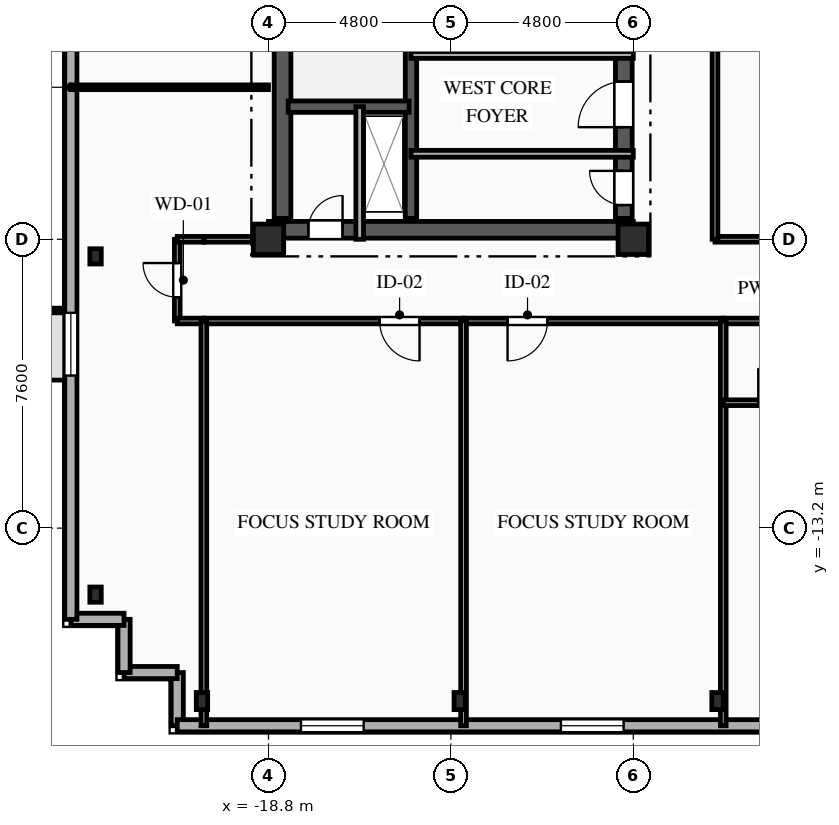
"""IFC4 building model, lengths in metres.
Left out: names, types, materials, properties, quantities, classifications, styles, units other than length and angle.
Written with IfcOpenShell. Run it as: python <this file> out.ifc"""

import sys

from ifc_helpers import new_model, si_unit, direction, frame, frame_2d, origin, origin_2d, place, context, subcontext, project, spatial, rectangle, i_section, extrude, element, fill, save


model = new_model("IFC4")
c1 = context("Model", 3, precision=1e-05, world=origin(), true_north=direction((0.0, 1.0)))
c2 = subcontext(c1, "Body", "Model", "MODEL_VIEW")
j1 = project(units=[si_unit("LENGTHUNIT", "METRE"), si_unit("PLANEANGLEUNIT", "RADIAN")], contexts=[c1])
p1 = place(None, origin())
s1 = spatial("IfcSite", under=j1, at=p1, CompositionType="ELEMENT")
p2 = place(p1, origin())
s2 = spatial("IfcBuilding", under=s1, at=p2, CompositionType="ELEMENT")
p3 = place(p2, frame((0.0, 0.0, 238.35)))
s3 = spatial("IfcBuildingStorey", under=s2, at=p3, CompositionType="ELEMENT", Elevation=238.35)
for number, where, z_axis, x_axis in (
    (1, (-18.8, -5.6, 0.0), (0.0, 0.0, 1.0), (1.0, 0.0, 0.0)),
    (2, (-9.2, -5.6, 0.0), (0.0, 0.0, 1.0), (1.0, 0.0, 0.0)),
):
    element("IfcColumn", number, at=place(p3, frame(where, z_axis=z_axis, x_axis=x_axis)), inside=s3, PredefinedType="COLUMN", context=c2, shape_type="SweptSolid", body=[
        extrude(rectangle(XDim=0.8, YDim=0.8, at=origin_2d()), origin(), (0.0, 0.0, 1.0), 3.35),
    ])
for number, where, z_axis, x_axis in (
    (3, (-20.55, -17.75, 0.0), (0.0, 0.0, 1.0), (1.0, 0.0, 0.0)),
    (4, (-13.767, -17.75, 0.0), (0.0, 0.0, 1.0), (1.0, 0.0, 0.0)),
    (5, (-6.983, -17.75, 0.0), (0.0, 0.0, 1.0), (1.0, 0.0, 0.0)),
):
    element("IfcColumn", number, at=place(p3, frame(where, z_axis=z_axis, x_axis=x_axis)), inside=s3, PredefinedType="COLUMN", context=c2, shape_type="SweptSolid", body=[
        extrude(i_section(OverallWidth=0.3, OverallDepth=0.45, WebThickness=0.014, FlangeThickness=0.026, FilletRadius=0.027, at=origin_2d()), origin(), (0.0, 0.0, 1.0), 3.35),
    ])
for number, where, z_axis, x_axis in (
    (6, (-23.35, -6.05, 0.0), (0.0, 0.0, 1.0), (1.0, 0.0, 0.0)),
    (7, (-23.35, -14.95, 0.0), (0.0, 0.0, 1.0), (1.0, 0.0, 0.0)),
):
    element("IfcColumn", number, at=place(p3, frame(where, z_axis=z_axis, x_axis=x_axis)), inside=s3, PredefinedType="COLUMN", context=c2, shape_type="SweptSolid", body=[
        extrude(i_section(OverallWidth=0.3, OverallDepth=0.4, WebThickness=0.013, FlangeThickness=0.024, FilletRadius=0.027, at=origin_2d()), origin(), (0.0, 0.0, 1.0), 3.35),
    ])
p4 = place(p3, frame((-21.2, -18.4, 0.0), z_axis=(0.0, 0.0, 1.0), x_axis=(0.0, 1.0, 0.0)))
e8 = element("IfcWall", 8, at=p4, inside=s3, PredefinedType="SOLIDWALL", context=c2, shape_type="SweptSolid", body=[
    extrude(rectangle(XDim=1.4, YDim=0.32, at=frame_2d((0.7, 0.0))), origin(), (0.0, 0.0, 1.0), 3.04),
])
p5 = place(p3, frame((-21.2, -17.0, 0.0), z_axis=(0.0, 0.0, 1.0), x_axis=(-1.0, 0.0, 0.0)))
e9 = element("IfcWall", 9, at=p5, inside=s3, PredefinedType="SOLIDWALL", context=c2, shape_type="SweptSolid", body=[
    extrude(rectangle(XDim=1.4, YDim=0.32, at=frame_2d((0.7, 0.0))), origin(), (0.0, 0.0, 1.0), 3.04),
])
for number, where, z_axis, x_axis in (
    (10, (-22.6, -17.0, 0.0), (0.0, 0.0, 1.0), (0.0, 1.0, 0.0)),
    (11, (-22.6, -15.6, 0.0), (0.0, 0.0, 1.0), (-1.0, 0.0, 0.0)),
):
    element("IfcWall", number, at=place(p3, frame(where, z_axis=z_axis, x_axis=x_axis)), inside=s3, PredefinedType="SOLIDWALL", context=c2, shape_type="SweptSolid", body=[
        extrude(rectangle(XDim=1.4, YDim=0.32, at=frame_2d((0.7, 0.0))), origin(), (0.0, 0.0, 1.0), 3.04),
    ])
p6 = place(p3, frame((-24.0, -15.6, 0.0), z_axis=(0.0, 0.0, 1.0), x_axis=(0.0, 1.0, 0.0)))
e12 = element("IfcWall", 12, at=p6, inside=s3, PredefinedType="SOLIDWALL", context=c2, shape_type="SweptSolid", body=[
    extrude(rectangle(XDim=28.0, YDim=0.32, at=frame_2d((14.0, 0.0))), origin(), (0.0, 0.0, 1.0), 3.04),
])
p7 = place(p6, frame((6.415, 0.0, 0.85)))
e13 = element("IfcOpeningElement", 13, at=p7, cuts=e12, PredefinedType="OPENING", context=c2, shape_type="SweptSolid", body=[
    extrude(rectangle(XDim=1.65, YDim=1.85, at=frame_2d((0.825, 0.925))), frame((0.0, 0.17, 0.0), z_axis=(0.0, -1.0, 0.0), x_axis=(1.0, 0.0, 0.0)), (0.0, 0.0, 1.0), 0.34),
])
p8 = place(p6, frame((20.04, 0.0, 0.85)))
e14 = element("IfcOpeningElement", 14, at=p8, cuts=e12, PredefinedType="OPENING", context=c2, shape_type="SweptSolid", body=[
    extrude(rectangle(XDim=1.6, YDim=1.85, at=frame_2d((0.8, 0.925))), frame((0.0, 0.17, 0.0), z_axis=(0.0, -1.0, 0.0), x_axis=(1.0, 0.0, 0.0)), (0.0, 0.0, 1.0), 0.34),
])
p9 = place(p3, frame((20.8, -18.4, 0.0), z_axis=(0.0, 0.0, 1.0), x_axis=(-1.0, 0.0, 0.0)))
e15 = element("IfcWall", 15, at=p9, inside=s3, PredefinedType="SOLIDWALL", context=c2, shape_type="SweptSolid", body=[
    extrude(rectangle(XDim=42.0, YDim=0.32, at=frame_2d((21.0, 0.0))), origin(), (0.0, 0.0, 1.0), 3.04),
])
p10 = place(p9, frame((3.015, 0.0, 0.85)))
e16 = element("IfcOpeningElement", 16, at=p10, cuts=e15, PredefinedType="OPENING", context=c2, shape_type="SweptSolid", body=[
    extrude(rectangle(XDim=1.65, YDim=1.85, at=frame_2d((0.825, 0.925))), frame((0.0, 0.17, 0.0), z_axis=(0.0, -1.0, 0.0), x_axis=(1.0, 0.0, 0.0)), (0.0, 0.0, 1.0), 0.34),
])
p11 = place(p9, frame((9.775, 0.0, 0.85)))
e17 = element("IfcOpeningElement", 17, at=p11, cuts=e15, PredefinedType="OPENING", context=c2, shape_type="SweptSolid", body=[
    extrude(rectangle(XDim=1.65, YDim=1.85, at=frame_2d((0.825, 0.925))), frame((0.0, 0.17, 0.0), z_axis=(0.0, -1.0, 0.0), x_axis=(1.0, 0.0, 0.0)), (0.0, 0.0, 1.0), 0.34),
])
p12 = place(p9, frame((19.74, 0.0, 0.85)))
e18 = element("IfcOpeningElement", 18, at=p12, cuts=e15, PredefinedType="OPENING", context=c2, shape_type="SweptSolid", body=[
    extrude(rectangle(XDim=2.2, YDim=1.85, at=frame_2d((1.1, 0.925))), frame((0.0, 0.17, 0.0), z_axis=(0.0, -1.0, 0.0), x_axis=(1.0, 0.0, 0.0)), (0.0, 0.0, 1.0), 0.34),
])
p13 = place(p9, frame((30.255, 0.0, 0.85)))
e19 = element("IfcOpeningElement", 19, at=p13, cuts=e15, PredefinedType="OPENING", context=c2, shape_type="SweptSolid", body=[
    extrude(rectangle(XDim=1.65, YDim=1.85, at=frame_2d((0.825, 0.925))), frame((0.0, 0.17, 0.0), z_axis=(0.0, -1.0, 0.0), x_axis=(1.0, 0.0, 0.0)), (0.0, 0.0, 1.0), 0.34),
])
p14 = place(p9, frame((37.095, 0.0, 0.85)))
e20 = element("IfcOpeningElement", 20, at=p14, cuts=e15, PredefinedType="OPENING", context=c2, shape_type="SweptSolid", body=[
    extrude(rectangle(XDim=1.65, YDim=1.85, at=frame_2d((0.825, 0.925))), frame((0.0, 0.17, 0.0), z_axis=(0.0, -1.0, 0.0), x_axis=(1.0, 0.0, 0.0)), (0.0, 0.0, 1.0), 0.34),
])
p15 = place(p3, frame((-18.8, -5.35, 0.0), z_axis=(0.0, 0.0, 1.0), x_axis=(1.0, 0.0, 0.0)))
e21 = element("IfcWall", 21, at=p15, inside=s3, PredefinedType="SHEAR", context=c2, shape_type="SweptSolid", body=[
    extrude(rectangle(XDim=9.6, YDim=0.44, at=frame_2d((4.8, 0.0))), origin(), (0.0, 0.0, 1.0), 3.04),
])
p16 = place(p15, frame((1.05, 0.0, 0.0)))
e22 = element("IfcOpeningElement", 22, at=p16, cuts=e21, PredefinedType="OPENING", context=c2, shape_type="SweptSolid", body=[
    extrude(rectangle(XDim=0.9, YDim=2.1, at=frame_2d((0.45, 1.05))), frame((0.0, 0.23, 0.0), z_axis=(0.0, -1.0, 0.0), x_axis=(1.0, 0.0, 0.0)), (0.0, 0.0, 1.0), 0.46),
])
p17 = place(p3, frame((-18.43, -5.05, 0.0), z_axis=(0.0, 0.0, 1.0), x_axis=(0.0, 1.0, 0.0)))
e23 = element("IfcWall", 23, at=p17, inside=s3, PredefinedType="SHEAR", context=c2, shape_type="SweptSolid", body=[
    extrude(rectangle(XDim=10.1, YDim=0.44, at=frame_2d((5.05, 0.0))), origin(), (0.0, 0.0, 1.0), 3.04),
])
p18 = place(p3, frame((-9.45, -5.05, 0.0), z_axis=(0.0, 0.0, 1.0), x_axis=(0.0, 1.0, 0.0)))
e24 = element("IfcWall", 24, at=p18, inside=s3, PredefinedType="SHEAR", context=c2, shape_type="SweptSolid", body=[
    extrude(rectangle(XDim=10.1, YDim=0.44, at=frame_2d((5.05, 0.0))), origin(), (0.0, 0.0, 1.0), 3.04),
])
p19 = place(p18, frame((7.15, 0.0, 0.0)))
e25 = element("IfcOpeningElement", 25, at=p19, cuts=e24, PredefinedType="OPENING", context=c2, shape_type="SweptSolid", body=[
    extrude(rectangle(XDim=0.9, YDim=2.1, at=frame_2d((0.45, 1.05))), frame((0.0, 0.23, 0.0), z_axis=(0.0, -1.0, 0.0), x_axis=(1.0, 0.0, 0.0)), (0.0, 0.0, 1.0), 0.46),
])
p20 = place(p18, frame((2.4, 0.0, 0.0)))
e26 = element("IfcOpeningElement", 26, at=p20, cuts=e24, PredefinedType="OPENING", context=c2, shape_type="SweptSolid", body=[
    extrude(rectangle(XDim=1.2, YDim=2.15, at=frame_2d((0.6, 1.075))), frame((0.0, 0.23, 0.0), z_axis=(0.0, -1.0, 0.0), x_axis=(1.0, 0.0, 0.0)), (0.0, 0.0, 1.0), 0.46),
])
p21 = place(p18, frame((0.35, 0.0, 0.0)))
e27 = element("IfcOpeningElement", 27, at=p21, cuts=e24, PredefinedType="OPENING", context=c2, shape_type="SweptSolid", body=[
    extrude(rectangle(XDim=0.9, YDim=2.1, at=frame_2d((0.45, 1.05))), frame((0.0, 0.23, 0.0), z_axis=(0.0, -1.0, 0.0), x_axis=(1.0, 0.0, 0.0)), (0.0, 0.0, 1.0), 0.46),
])
p22 = place(p18, frame((5.0, 0.0, 0.0)))
e28 = element("IfcOpeningElement", 28, at=p22, cuts=e24, PredefinedType="OPENING", context=c2, shape_type="SweptSolid", body=[
    extrude(rectangle(XDim=0.9, YDim=2.1, at=frame_2d((0.45, 1.05))), frame((0.0, 0.23, 0.0), z_axis=(0.0, -1.0, 0.0), x_axis=(1.0, 0.0, 0.0)), (0.0, 0.0, 1.0), 0.46),
])
p23 = place(p3, frame((-15.05, -5.05, 0.0), z_axis=(0.0, 0.0, 1.0), x_axis=(0.0, 1.0, 0.0)))
e29 = element("IfcWall", 29, at=p23, inside=s3, PredefinedType="SHEAR", context=c2, shape_type="SweptSolid", body=[
    extrude(rectangle(XDim=10.1, YDim=0.3, at=frame_2d((5.05, 0.0))), origin(), (0.0, 0.0, 1.0), 3.04),
])
p24 = place(p3, frame((-18.28, -2.11, 0.0), z_axis=(0.0, 0.0, 1.0), x_axis=(1.0, 0.0, 0.0)))
e30 = element("IfcWall", 30, at=p24, inside=s3, PredefinedType="SHEAR", context=c2, shape_type="SweptSolid", body=[
    extrude(rectangle(XDim=3.18, YDim=0.3, at=frame_2d((1.59, 0.0))), origin(), (0.0, 0.0, 1.0), 3.04),
])
p25 = place(p3, frame((-16.4, -5.6, 0.0), z_axis=(0.0, 0.0, 1.0), x_axis=(0.0, 1.0, 0.0)))
e31 = element("IfcWall", 31, at=p25, inside=s3, PredefinedType="PARTITIONING", context=c2, shape_type="SweptSolid", body=[
    extrude(rectangle(XDim=3.49, YDim=0.2, at=frame_2d((1.745, 0.0))), origin(), (0.0, 0.0, 1.0), 3.04),
])
p26 = place(p3, frame((-15.05, -3.35, 0.0), z_axis=(0.0, 0.0, 1.0), x_axis=(1.0, 0.0, 0.0)))
e32 = element("IfcWall", 32, at=p26, inside=s3, PredefinedType="PARTITIONING", context=c2, shape_type="SweptSolid", body=[
    extrude(rectangle(XDim=5.85, YDim=0.18, at=frame_2d((2.925, 0.0))), origin(), (0.0, 0.0, 1.0), 2.755),
])
p27 = place(p3, frame((-9.2, -0.75, 0.0), z_axis=(0.0, 0.0, 1.0), x_axis=(-1.0, 0.0, 0.0)))
e33 = element("IfcWall", 33, at=p27, inside=s3, PredefinedType="PARTITIONING", context=c2, shape_type="SweptSolid", body=[
    extrude(rectangle(XDim=5.85, YDim=0.18, at=frame_2d((2.925, 0.0))), origin(), (0.0, 0.0, 1.0), 3.04),
])
p28 = place(p3, frame((-21.2, -7.75, 0.0), z_axis=(0.0, 0.0, 1.0), x_axis=(0.0, 1.0, 0.0)))
e34 = element("IfcWall", 34, at=p28, inside=s3, PredefinedType="PARTITIONING", context=c2, shape_type="SweptSolid", body=[
    extrude(rectangle(XDim=2.15, YDim=0.15, at=frame_2d((1.075, 0.0))), origin(), (0.0, 0.0, 1.0), 2.695),
])
p29 = place(p28, frame((0.625, 0.0, 0.0)))
e35 = element("IfcOpeningElement", 35, at=p29, cuts=e34, PredefinedType="OPENING", context=c2, shape_type="SweptSolid", body=[
    extrude(rectangle(XDim=0.9, YDim=2.1, at=frame_2d((0.45, 1.05))), frame((0.0, 0.085, 0.0), z_axis=(0.0, -1.0, 0.0), x_axis=(1.0, 0.0, 0.0)), (0.0, 0.0, 1.0), 0.17),
])
p30 = place(p3, frame((-20.5, -5.6, 0.0), z_axis=(0.0, 0.0, 1.0), x_axis=(1.0, 0.0, 0.0)))
e36 = element("IfcWall", 36, at=p30, inside=s3, PredefinedType="PARTITIONING", context=c2, shape_type="SweptSolid", body=[
    extrude(rectangle(XDim=1.7, YDim=0.15, at=frame_2d((0.85, 0.0))), origin(), (0.0, 0.0, 1.0), 3.04),
])
for number, where, z_axis, x_axis in (
    (37, (-20.5, -7.75, 0.0), (0.0, 0.0, 1.0), (-1.0, 0.0, 0.0)),
    (38, (-21.2, -5.6, 0.0), (0.0, 0.0, 1.0), (1.0, 0.0, 0.0)),
):
    element("IfcWall", number, at=place(p3, frame(where, z_axis=z_axis, x_axis=x_axis)), inside=s3, PredefinedType="PARTITIONING", context=c2, shape_type="SweptSolid", body=[
        extrude(rectangle(XDim=0.7, YDim=0.15, at=frame_2d((0.35, 0.0))), origin(), (0.0, 0.0, 1.0), 3.04),
    ])
p31 = place(p3, frame((-13.667, -7.75, 0.0), z_axis=(0.0, 0.0, 1.0), x_axis=(-1.0, 0.0, 0.0)))
e39 = element("IfcWall", 39, at=p31, inside=s3, PredefinedType="PARTITIONING", context=c2, shape_type="SweptSolid", body=[
    extrude(rectangle(XDim=6.833, YDim=0.15, at=frame_2d((3.417, 0.0))), origin(), (0.0, 0.0, 1.0), 3.04),
])
p32 = place(p31, frame((1.158, 0.0, 0.0)))
e40 = element("IfcOpeningElement", 40, at=p32, cuts=e39, PredefinedType="OPENING", context=c2, shape_type="SweptSolid", body=[
    extrude(rectangle(XDim=1.05, YDim=2.15, at=frame_2d((0.525, 1.075))), frame((0.0, 0.085, 0.0), z_axis=(0.0, -1.0, 0.0), x_axis=(1.0, 0.0, 0.0)), (0.0, 0.0, 1.0), 0.17),
])
p33 = place(p3, frame((-6.833, -7.75, 0.0), z_axis=(0.0, 0.0, 1.0), x_axis=(-1.0, 0.0, 0.0)))
e41 = element("IfcWall", 41, at=p33, inside=s3, PredefinedType="PARTITIONING", context=c2, shape_type="SweptSolid", body=[
    extrude(rectangle(XDim=6.833, YDim=0.15, at=frame_2d((3.417, 0.0))), origin(), (0.0, 0.0, 1.0), 3.04),
])
p34 = place(p33, frame((4.625, 0.0, 0.0)))
e42 = element("IfcOpeningElement", 42, at=p34, cuts=e41, PredefinedType="OPENING", context=c2, shape_type="SweptSolid", body=[
    extrude(rectangle(XDim=1.05, YDim=2.15, at=frame_2d((0.525, 1.075))), frame((0.0, 0.085, 0.0), z_axis=(0.0, -1.0, 0.0), x_axis=(1.0, 0.0, 0.0)), (0.0, 0.0, 1.0), 0.17),
])
p35 = place(p3, frame((-4.383, -7.75, 0.0), z_axis=(0.0, 0.0, 1.0), x_axis=(-1.0, 0.0, 0.0)))
e43 = element("IfcWall", 43, at=p35, inside=s3, PredefinedType="PLUMBINGWALL", context=c2, shape_type="SweptSolid", body=[
    extrude(rectangle(XDim=2.45, YDim=0.15, at=frame_2d((1.225, 0.0))), origin(), (0.0, 0.0, 1.0), 3.04),
])
p36 = place(p3, frame((-7.05, -5.6, 0.0), z_axis=(0.0, 0.0, 1.0), x_axis=(1.0, 0.0, 0.0)))
e44 = element("IfcWall", 44, at=p36, inside=s3, PredefinedType="PARTITIONING", context=c2, shape_type="SweptSolid", body=[
    extrude(rectangle(XDim=7.05, YDim=0.15, at=frame_2d((3.525, 0.0))), origin(), (0.0, 0.0, 1.0), 2.525),
])
p37 = place(p3, frame((-7.05, 8.5, 0.0), z_axis=(0.0, 0.0, 1.0), x_axis=(0.0, -1.0, 0.0)))
e45 = element("IfcWall", 45, at=p37, inside=s3, PredefinedType="PARTITIONING", context=c2, shape_type="SweptSolid", body=[
    extrude(rectangle(XDim=14.1, YDim=0.15, at=frame_2d((7.05, 0.0))), origin(), (0.0, 0.0, 1.0), 3.04),
])
p38 = place(p37, frame((8.074, 0.0, 0.0)))
e46 = element("IfcOpeningElement", 46, at=p38, cuts=e45, PredefinedType="OPENING", context=c2, shape_type="SweptSolid", body=[
    extrude(rectangle(XDim=0.95, YDim=2.1, at=frame_2d((0.475, 1.05))), frame((0.0, 0.085, 0.0), z_axis=(0.0, -1.0, 0.0), x_axis=(1.0, 0.0, 0.0)), (0.0, 0.0, 1.0), 0.17),
])
p39 = place(p3, frame((-24.0, -1.6, 0.0), z_axis=(0.0, 0.0, 1.0), x_axis=(1.0, 0.0, 0.0)))
e47 = element("IfcWall", 47, at=p39, inside=s3, PredefinedType="PARTITIONING", context=c2, shape_type="SweptSolid", body=[
    extrude(rectangle(XDim=5.2, YDim=0.125, at=frame_2d((2.6, 0.0))), origin(), (0.0, 0.0, 1.0), 3.04),
])
p40 = place(p3, frame((-20.5, -7.75, 0.0), z_axis=(0.0, 0.0, 1.0), x_axis=(0.0, -1.0, 0.0)))
e48 = element("IfcWall", 48, at=p40, inside=s3, PredefinedType="PARTITIONING", context=c2, shape_type="SweptSolid", body=[
    extrude(rectangle(XDim=10.65, YDim=0.15, at=frame_2d((5.325, 0.0))), origin(), (0.0, 0.0, 1.0), 2.665),
])
p41 = place(p3, frame((-13.667, -7.75, 0.0), z_axis=(0.0, 0.0, 1.0), x_axis=(0.0, -1.0, 0.0)))
e49 = element("IfcWall", 49, at=p41, inside=s3, PredefinedType="PARTITIONING", context=c2, shape_type="SweptSolid", body=[
    extrude(rectangle(XDim=10.65, YDim=0.15, at=frame_2d((5.325, 0.0))), origin(), (0.0, 0.0, 1.0), 3.04),
])
p42 = place(p3, frame((-6.833, -9.9, 0.0), z_axis=(0.0, 0.0, 1.0), x_axis=(0.0, -1.0, 0.0)))
e50 = element("IfcWall", 50, at=p42, inside=s3, PredefinedType="PARTITIONING", context=c2, shape_type="SweptSolid", body=[
    extrude(rectangle(XDim=8.5, YDim=0.15, at=frame_2d((4.25, 0.0))), origin(), (0.0, 0.0, 1.0), 2.665),
])
p43 = place(p3, frame((-6.833, -7.75, 0.0), z_axis=(0.0, 0.0, 1.0), x_axis=(0.0, -1.0, 0.0)))
e51 = element("IfcWall", 51, at=p43, inside=s3, PredefinedType="PLUMBINGWALL", context=c2, shape_type="SweptSolid", body=[
    extrude(rectangle(XDim=2.15, YDim=0.15, at=frame_2d((1.075, 0.0))), origin(), (0.0, 0.0, 1.0), 3.04),
])
p44 = place(p3, frame((-6.833, -9.9, 0.0), z_axis=(0.0, 0.0, 1.0), x_axis=(1.0, 0.0, 0.0)))
e52 = element("IfcWall", 52, at=p44, inside=s3, PredefinedType="PLUMBINGWALL", context=c2, shape_type="SweptSolid", body=[
    extrude(rectangle(XDim=2.45, YDim=0.15, at=frame_2d((1.225, 0.0))), origin(), (0.0, 0.0, 1.0), 3.04),
])
p45 = place(p44, frame((0.921, 0.0, 0.0)))
e53 = element("IfcOpeningElement", 53, at=p45, cuts=e52, PredefinedType="OPENING", context=c2, shape_type="SweptSolid", body=[
    extrude(rectangle(XDim=0.9, YDim=2.1, at=frame_2d((0.45, 1.05))), frame((0.0, 0.085, 0.0), z_axis=(0.0, -1.0, 0.0), x_axis=(1.0, 0.0, 0.0)), (0.0, 0.0, 1.0), 0.17),
])
p46 = place(p7, origin())
e54 = element("IfcWindow", 54, at=p46, inside=s3, PartitioningType="SINGLE_PANEL", PredefinedType="WINDOW", context=c2, shape_type="SweptSolid", body=[
    extrude(rectangle(XDim=1.65, YDim=1.85, at=frame_2d((0.825, 0.925))), frame((0.0, 0.03, 0.0), z_axis=(0.0, -1.0, 0.0), x_axis=(1.0, 0.0, 0.0)), (0.0, 0.0, 1.0), 0.06),
])
fill(e13, e54)
p47 = place(p13, origin())
e55 = element("IfcWindow", 55, at=p47, inside=s3, PartitioningType="SINGLE_PANEL", PredefinedType="WINDOW", context=c2, shape_type="SweptSolid", body=[
    extrude(rectangle(XDim=1.65, YDim=1.85, at=frame_2d((0.825, 0.925))), frame((0.0, 0.03, 0.0), z_axis=(0.0, -1.0, 0.0), x_axis=(1.0, 0.0, 0.0)), (0.0, 0.0, 1.0), 0.06),
])
fill(e19, e55)
p48 = place(p14, origin())
e56 = element("IfcWindow", 56, at=p48, inside=s3, PartitioningType="SINGLE_PANEL", PredefinedType="WINDOW", context=c2, shape_type="SweptSolid", body=[
    extrude(rectangle(XDim=1.65, YDim=1.85, at=frame_2d((0.825, 0.925))), frame((0.0, 0.03, 0.0), z_axis=(0.0, -1.0, 0.0), x_axis=(1.0, 0.0, 0.0)), (0.0, 0.0, 1.0), 0.06),
])
fill(e20, e56)
p49 = place(p16, origin())
e57 = element("IfcDoor", 57, at=p49, inside=s3, OperationType="SINGLE_SWING_RIGHT", PredefinedType="DOOR", context=c2, shape_type="SweptSolid", body=[
    extrude(rectangle(XDim=0.9, YDim=2.1, at=frame_2d((0.45, 1.05))), frame((0.0, 0.025, 0.0), z_axis=(0.0, -1.0, 0.0), x_axis=(1.0, 0.0, 0.0)), (0.0, 0.0, 1.0), 0.05),
])
fill(e22, e57)
p50 = place(p20, origin())
e58 = element("IfcDoor", 58, at=p50, inside=s3, OperationType="SINGLE_SWING_LEFT", PredefinedType="DOOR", context=c2, shape_type="SweptSolid", body=[
    extrude(rectangle(XDim=1.2, YDim=2.15, at=frame_2d((0.6, 1.075))), frame((0.0, 0.025, 0.0), z_axis=(0.0, -1.0, 0.0), x_axis=(1.0, 0.0, 0.0)), (0.0, 0.0, 1.0), 0.05),
])
fill(e26, e58)
p51 = place(p21, origin())
e59 = element("IfcDoor", 59, at=p51, inside=s3, OperationType="SINGLE_SWING_RIGHT", PredefinedType="DOOR", context=c2, shape_type="SweptSolid", body=[
    extrude(rectangle(XDim=0.9, YDim=2.1, at=frame_2d((0.45, 1.05))), frame((0.0, 0.025, 0.0), z_axis=(0.0, -1.0, 0.0), x_axis=(1.0, 0.0, 0.0)), (0.0, 0.0, 1.0), 0.05),
])
fill(e27, e59)
p52 = place(p29, origin())
e60 = element("IfcDoor", 60, at=p52, inside=s3, OperationType="SINGLE_SWING_RIGHT", PredefinedType="DOOR", context=c2, shape_type="SweptSolid", body=[
    extrude(rectangle(XDim=0.9, YDim=2.1, at=frame_2d((0.45, 1.05))), frame((0.0, 0.025, 0.0), z_axis=(0.0, -1.0, 0.0), x_axis=(1.0, 0.0, 0.0)), (0.0, 0.0, 1.0), 0.05),
])
fill(e35, e60)
p53 = place(p32, origin())
e61 = element("IfcDoor", 61, at=p53, inside=s3, OperationType="SINGLE_SWING_LEFT", PredefinedType="DOOR", context=c2, shape_type="SweptSolid", body=[
    extrude(rectangle(XDim=1.05, YDim=2.15, at=frame_2d((0.525, 1.075))), frame((0.0, 0.025, 0.0), z_axis=(0.0, -1.0, 0.0), x_axis=(1.0, 0.0, 0.0)), (0.0, 0.0, 1.0), 0.05),
])
fill(e40, e61)
p54 = place(p34, origin())
e62 = element("IfcDoor", 62, at=p54, inside=s3, OperationType="SINGLE_SWING_RIGHT", PredefinedType="DOOR", context=c2, shape_type="SweptSolid", body=[
    extrude(rectangle(XDim=1.05, YDim=2.15, at=frame_2d((0.525, 1.075))), frame((0.0, 0.025, 0.0), z_axis=(0.0, -1.0, 0.0), x_axis=(1.0, 0.0, 0.0)), (0.0, 0.0, 1.0), 0.05),
])
fill(e42, e62)
p55 = place(p45, origin())
e63 = element("IfcDoor", 63, at=p55, inside=s3, OperationType="SINGLE_SWING_LEFT", PredefinedType="DOOR", context=c2, shape_type="SweptSolid", body=[
    extrude(rectangle(XDim=0.9, YDim=2.1, at=frame_2d((0.45, 1.05))), frame((0.0, 0.025, 0.0), z_axis=(0.0, -1.0, 0.0), x_axis=(1.0, 0.0, 0.0)), (0.0, 0.0, 1.0), 0.05),
])
fill(e53, e63)
save(model, sys.argv[1])
